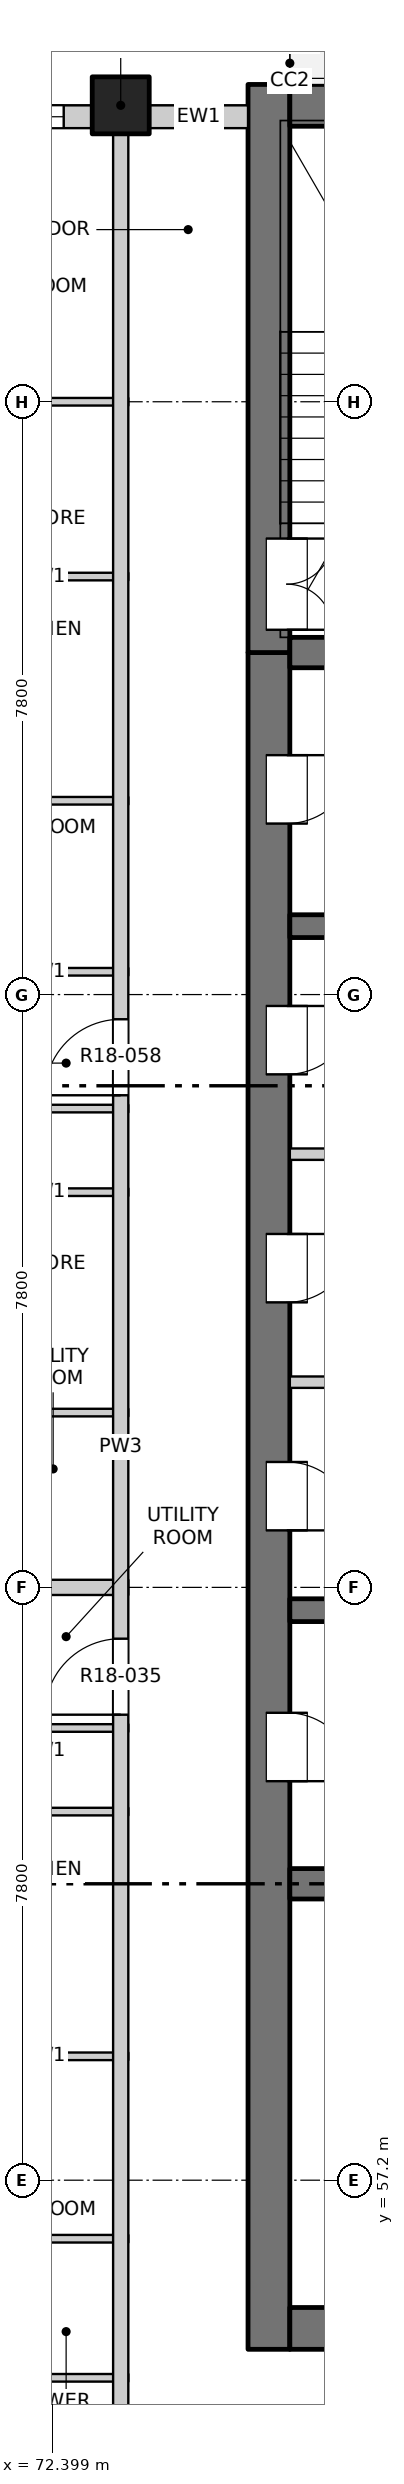
"""IFC4 building model, lengths in metres.
Left out: names, types, materials, properties, quantities, classifications, styles, units other than length and angle.
Written with IfcOpenShell. Run it as: python <this file> out.ifc"""

import sys

from ifc_helpers import new_model, si_unit, direction, frame, frame_2d, origin, origin_2d, place, context, subcontext, project, spatial, rectangle, extrude, element, fill, save


model = new_model("IFC4")
c1 = context("Model", 3, precision=1e-05, world=origin(), true_north=direction((0.0, 1.0)))
c2 = subcontext(c1, "Body", "Model", "MODEL_VIEW")
j1 = project(units=[si_unit("LENGTHUNIT", "METRE"), si_unit("PLANEANGLEUNIT", "RADIAN")], contexts=[c1])
p1 = place(None, origin())
s1 = spatial("IfcSite", under=j1, at=p1, CompositionType="ELEMENT")
p2 = place(p1, origin())
s2 = spatial("IfcBuilding", under=s1, at=p2, CompositionType="ELEMENT")
p3 = place(p2, frame((0.0, 0.0, 189.4)))
s3 = spatial("IfcBuildingStorey", under=s2, at=p3, CompositionType="ELEMENT", Elevation=189.4)
p4 = place(p3, frame((73.3, 84.5, -0.25), z_axis=(0.0, 0.0, 1.0), x_axis=(1.0, 0.0, 0.0)))
e1 = element("IfcColumn", 1, at=p4, inside=s3, PredefinedType="COLUMN", context=c2, shape_type="SweptSolid", body=[
    extrude(rectangle(XDim=0.75, YDim=0.75, at=origin_2d()), origin(), (0.0, 0.0, 1.0), 3.35),
])
p5 = place(p3, frame((75.25, 54.975, -0.25), z_axis=(0.0, 0.0, 1.0), x_axis=(0.0, 1.0, 0.0)))
e2 = element("IfcWall", 2, at=p5, inside=s3, PredefinedType="SOLIDWALL", context=c2, shape_type="SweptSolid", body=[
    extrude(rectangle(XDim=22.325, YDim=0.55, at=frame_2d((11.163, 0.0))), origin(), (0.0, 0.0, 1.0), 3.35),
])
p6 = place(p5, frame((7.475, 0.0, 0.25)))
e3 = element("IfcOpeningElement", 3, at=p6, cuts=e2, PredefinedType="OPENING", context=c2, shape_type="SweptSolid", body=[
    extrude(rectangle(XDim=0.9, YDim=2.1, at=frame_2d((0.45, 1.05))), frame((0.0, 0.285, 0.0), z_axis=(0.0, -1.0, 0.0), x_axis=(1.0, 0.0, 0.0)), (0.0, 0.0, 1.0), 0.57),
])
p7 = place(p5, frame((10.775, 0.0, 0.25)))
e4 = element("IfcOpeningElement", 4, at=p7, cuts=e2, PredefinedType="OPENING", context=c2, shape_type="SweptSolid", body=[
    extrude(rectangle(XDim=0.9, YDim=2.1, at=frame_2d((0.45, 1.05))), frame((0.0, 0.285, 0.0), z_axis=(0.0, -1.0, 0.0), x_axis=(1.0, 0.0, 0.0)), (0.0, 0.0, 1.0), 0.57),
])
p8 = place(p5, frame((13.775, 0.0, 0.25)))
e5 = element("IfcOpeningElement", 5, at=p8, cuts=e2, PredefinedType="OPENING", context=c2, shape_type="SweptSolid", body=[
    extrude(rectangle(XDim=0.9, YDim=2.1, at=frame_2d((0.45, 1.05))), frame((0.0, 0.285, 0.0), z_axis=(0.0, -1.0, 0.0), x_axis=(1.0, 0.0, 0.0)), (0.0, 0.0, 1.0), 0.57),
])
p9 = place(p5, frame((16.775, 0.0, 0.25)))
e6 = element("IfcOpeningElement", 6, at=p9, cuts=e2, PredefinedType="OPENING", context=c2, shape_type="SweptSolid", body=[
    extrude(rectangle(XDim=0.9, YDim=2.1, at=frame_2d((0.45, 1.05))), frame((0.0, 0.285, 0.0), z_axis=(0.0, -1.0, 0.0), x_axis=(1.0, 0.0, 0.0)), (0.0, 0.0, 1.0), 0.57),
])
p10 = place(p5, frame((20.075, 0.0, 0.25)))
e7 = element("IfcOpeningElement", 7, at=p10, cuts=e2, PredefinedType="OPENING", context=c2, shape_type="SweptSolid", body=[
    extrude(rectangle(XDim=0.9, YDim=2.1, at=frame_2d((0.45, 1.05))), frame((0.0, 0.285, 0.0), z_axis=(0.0, -1.0, 0.0), x_axis=(1.0, 0.0, 0.0)), (0.0, 0.0, 1.0), 0.57),
])
p11 = place(p3, frame((75.25, 77.3, -0.25), z_axis=(0.0, 0.0, 1.0), x_axis=(0.0, 1.0, 0.0)))
e8 = element("IfcWall", 8, at=p11, inside=s3, PredefinedType="SOLIDWALL", context=c2, shape_type="SweptSolid", body=[
    extrude(rectangle(XDim=7.475, YDim=0.55, at=frame_2d((3.737, 0.0))), origin(), (0.0, 0.0, 1.0), 3.35),
])
p12 = place(p11, frame((0.3, 0.0, 0.25)))
e9 = element("IfcOpeningElement", 9, at=p12, cuts=e8, PredefinedType="OPENING", context=c2, shape_type="SweptSolid", body=[
    extrude(rectangle(XDim=1.2, YDim=2.1, at=frame_2d((0.6, 1.05))), frame((0.0, 0.285, 0.0), z_axis=(0.0, -1.0, 0.0), x_axis=(1.0, 0.0, 0.0)), (0.0, 0.0, 1.0), 0.57),
])
p13 = place(p3, frame((75.525, 55.25, -0.25), z_axis=(0.0, 0.0, 1.0), x_axis=(1.0, 0.0, 0.0)))
e10 = element("IfcWall", 10, at=p13, inside=s3, PredefinedType="SOLIDWALL", context=c2, shape_type="SweptSolid", body=[
    extrude(rectangle(XDim=18.95, YDim=0.55, at=frame_2d((9.475, 0.0))), origin(), (0.0, 0.0, 1.0), 3.35),
])
p14 = place(p13, frame((8.725, 0.0, 0.25)))
e11 = element("IfcOpeningElement", 11, at=p14, cuts=e10, PredefinedType="OPENING", context=c2, shape_type="SweptSolid", body=[
    extrude(rectangle(XDim=1.5, YDim=2.1, at=frame_2d((0.75, 1.05))), frame((0.0, 0.285, 0.0), z_axis=(0.0, -1.0, 0.0), x_axis=(1.0, 0.0, 0.0)), (0.0, 0.0, 1.0), 0.57),
])
p15 = place(p3, frame((75.525, 84.5, -0.25), z_axis=(0.0, 0.0, 1.0), x_axis=(1.0, 0.0, 0.0)))
e12 = element("IfcWall", 12, at=p15, inside=s3, PredefinedType="SOLIDWALL", context=c2, shape_type="SweptSolid", body=[
    extrude(rectangle(XDim=18.95, YDim=0.55, at=frame_2d((9.475, 0.0))), origin(), (0.0, 0.0, 1.0), 3.35),
])
p16 = place(p3, frame((75.525, 61.1, -0.25), z_axis=(0.0, 0.0, 1.0), x_axis=(1.0, 0.0, 0.0)))
e13 = element("IfcWall", 13, at=p16, inside=s3, PredefinedType="SOLIDWALL", context=c2, shape_type="SweptSolid", body=[
    extrude(rectangle(XDim=3.775, YDim=0.4, at=frame_2d((1.888, 0.0))), origin(), (0.0, 0.0, 1.0), 3.35),
])
for number, where, z_axis, x_axis in (
    (14, (75.525, 64.7, -0.25), (0.0, 0.0, 1.0), (1.0, 0.0, 0.0)),
    (15, (75.525, 73.7, -0.25), (0.0, 0.0, 1.0), (1.0, 0.0, 0.0)),
):
    element("IfcWall", number, at=place(p3, frame(where, z_axis=z_axis, x_axis=x_axis)), inside=s3, PredefinedType="SOLIDWALL", context=c2, shape_type="SweptSolid", body=[
        extrude(rectangle(XDim=3.775, YDim=0.3, at=frame_2d((1.888, 0.0))), origin(), (0.0, 0.0, 1.0), 3.35),
    ])
p17 = place(p3, frame((75.525, 77.3, -0.25), z_axis=(0.0, 0.0, 1.0), x_axis=(1.0, 0.0, 0.0)))
e16 = element("IfcWall", 16, at=p17, inside=s3, PredefinedType="SOLIDWALL", context=c2, shape_type="SweptSolid", body=[
    extrude(rectangle(XDim=3.775, YDim=0.4, at=frame_2d((1.888, 0.0))), origin(), (0.0, 0.0, 1.0), 3.35),
])
p18 = place(p3, frame((69.4, 84.35, 0.0), z_axis=(0.0, 0.0, 1.0), x_axis=(1.0, 0.0, 0.0)))
e17 = element("IfcWall", 17, at=p18, inside=s3, PredefinedType="SOLIDWALL", context=c2, shape_type="SweptSolid", body=[
    extrude(rectangle(XDim=3.525, YDim=0.3, at=frame_2d((1.763, 0.0))), origin(), (0.0, 0.0, 1.0), 3.1),
])
p19 = place(p18, frame((0.75, 0.0, 0.9)))
e18 = element("IfcOpeningElement", 18, at=p19, cuts=e17, PredefinedType="OPENING", context=c2, shape_type="SweptSolid", body=[
    extrude(rectangle(XDim=2.4, YDim=1.8, at=frame_2d((1.2, 0.9))), frame((0.0, 0.16, 0.0), z_axis=(0.0, -1.0, 0.0), x_axis=(1.0, 0.0, 0.0)), (0.0, 0.0, 1.0), 0.32),
])
p20 = place(p3, frame((73.675, 84.35, 0.0), z_axis=(0.0, 0.0, 1.0), x_axis=(1.0, 0.0, 0.0)))
e19 = element("IfcWall", 19, at=p20, inside=s3, PredefinedType="SOLIDWALL", context=c2, shape_type="SweptSolid", body=[
    extrude(rectangle(XDim=1.3, YDim=0.3, at=frame_2d((0.65, 0.0))), origin(), (0.0, 0.0, 1.0), 3.1),
])
for number, where, z_axis, x_axis in (
    (20, (71.18, 54.6, 0.0), (0.0, 0.0, 1.0), (1.0, 0.0, 0.0)),
    (21, (71.18, 56.43, 0.0), (0.0, 0.0, 1.0), (1.0, 0.0, 0.0)),
    (22, (71.18, 58.83, 0.0), (0.0, 0.0, 1.0), (1.0, 0.0, 0.0)),
    (23, (71.18, 62.05, 0.0), (0.0, 0.0, 1.0), (1.0, 0.0, 0.0)),
    (24, (71.18, 63.15, 0.0), (0.0, 0.0, 1.0), (1.0, 0.0, 0.0)),
):
    element("IfcWall", number, at=place(p3, frame(where, z_axis=z_axis, x_axis=x_axis)), inside=s3, PredefinedType="PARTITIONING", context=c2, shape_type="SweptSolid", body=[
        extrude(rectangle(XDim=2.22, YDim=0.1, at=frame_2d((1.11, 0.0))), origin(), (0.0, 0.0, 1.0), 3.1),
    ])
p21 = place(p3, frame((65.8, 65.0, 0.0), z_axis=(0.0, 0.0, 1.0), x_axis=(1.0, 0.0, 0.0)))
e25 = element("IfcWall", 25, at=p21, inside=s3, PredefinedType="PARTITIONING", context=c2, shape_type="SweptSolid", body=[
    extrude(rectangle(XDim=7.6, YDim=0.2, at=frame_2d((3.8, 0.0))), origin(), (0.0, 0.0, 1.0), 3.1),
])
p22 = place(p3, frame((71.18, 67.3, 0.0), z_axis=(0.0, 0.0, 1.0), x_axis=(1.0, 0.0, 0.0)))
e26 = element("IfcWall", 26, at=p22, inside=s3, PredefinedType="PARTITIONING", context=c2, shape_type="SweptSolid", body=[
    extrude(rectangle(XDim=2.22, YDim=0.1, at=frame_2d((1.11, 0.0))), origin(), (0.0, 0.0, 1.0), 3.1),
])
p23 = place(p3, frame((75.525, 67.7, 0.0), z_axis=(0.0, 0.0, 1.0), x_axis=(1.0, 0.0, 0.0)))
e27 = element("IfcWall", 27, at=p23, inside=s3, PredefinedType="PARTITIONING", context=c2, shape_type="SweptSolid", body=[
    extrude(rectangle(XDim=3.775, YDim=0.15, at=frame_2d((1.887, 0.0))), origin(), (0.0, 0.0, 1.0), 3.1),
])
p24 = place(p3, frame((71.18, 70.2, 0.0), z_axis=(0.0, 0.0, 1.0), x_axis=(1.0, 0.0, 0.0)))
e28 = element("IfcWall", 28, at=p24, inside=s3, PredefinedType="PARTITIONING", context=c2, shape_type="SweptSolid", body=[
    extrude(rectangle(XDim=2.22, YDim=0.1, at=frame_2d((1.11, 0.0))), origin(), (0.0, 0.0, 1.0), 3.1),
])
p25 = place(p3, frame((75.525, 70.7, 0.0), z_axis=(0.0, 0.0, 1.0), x_axis=(1.0, 0.0, 0.0)))
e29 = element("IfcWall", 29, at=p25, inside=s3, PredefinedType="PARTITIONING", context=c2, shape_type="SweptSolid", body=[
    extrude(rectangle(XDim=3.775, YDim=0.15, at=frame_2d((1.887, 0.0))), origin(), (0.0, 0.0, 1.0), 3.1),
])
for number, where, z_axis, x_axis in (
    (30, (71.18, 71.3, 0.0), (0.0, 0.0, 1.0), (1.0, 0.0, 0.0)),
    (31, (71.18, 73.1, 0.0), (0.0, 0.0, 1.0), (1.0, 0.0, 0.0)),
    (32, (71.18, 75.35, 0.0), (0.0, 0.0, 1.0), (1.0, 0.0, 0.0)),
    (33, (71.18, 78.3, 0.0), (0.0, 0.0, 1.0), (1.0, 0.0, 0.0)),
):
    element("IfcWall", number, at=place(p3, frame(where, z_axis=z_axis, x_axis=x_axis)), inside=s3, PredefinedType="PARTITIONING", context=c2, shape_type="SweptSolid", body=[
        extrude(rectangle(XDim=2.22, YDim=0.1, at=frame_2d((1.11, 0.0))), origin(), (0.0, 0.0, 1.0), 3.1),
    ])
p26 = place(p3, frame((65.8, 80.6, 0.0), z_axis=(0.0, 0.0, 1.0), x_axis=(1.0, 0.0, 0.0)))
e34 = element("IfcWall", 34, at=p26, inside=s3, PredefinedType="PARTITIONING", context=c2, shape_type="SweptSolid", body=[
    extrude(rectangle(XDim=7.6, YDim=0.1, at=frame_2d((3.8, 0.0))), origin(), (0.0, 0.0, 1.0), 3.1),
])
p27 = place(p26, frame((4.14, 0.0, 0.0)))
e35 = element("IfcOpeningElement", 35, at=p27, cuts=e34, PredefinedType="OPENING", context=c2, shape_type="SweptSolid", body=[
    extrude(rectangle(XDim=0.9, YDim=2.1, at=frame_2d((0.45, 1.05))), frame((0.0, 0.06, 0.0), z_axis=(0.0, -1.0, 0.0), x_axis=(1.0, 0.0, 0.0)), (0.0, 0.0, 1.0), 0.12),
])
p28 = place(p3, frame((73.3, 49.5, 0.0), z_axis=(0.0, 0.0, 1.0), x_axis=(0.0, 1.0, 0.0)))
e36 = element("IfcWall", 36, at=p28, inside=s3, PredefinedType="PARTITIONING", context=c2, shape_type="SweptSolid", body=[
    extrude(rectangle(XDim=34.7, YDim=0.2, at=frame_2d((17.35, 0.0))), origin(), (0.0, 0.0, 1.0), 3.1),
])
p29 = place(p28, frame((13.825, 0.0, 0.0)))
e37 = element("IfcOpeningElement", 37, at=p29, cuts=e36, PredefinedType="OPENING", context=c2, shape_type="SweptSolid", body=[
    extrude(rectangle(XDim=1.0, YDim=2.1, at=frame_2d((0.5, 1.05))), frame((0.0, 0.11, 0.0), z_axis=(0.0, -1.0, 0.0), x_axis=(1.0, 0.0, 0.0)), (0.0, 0.0, 1.0), 0.22),
])
p30 = place(p28, frame((21.975, 0.0, 0.0)))
e38 = element("IfcOpeningElement", 38, at=p30, cuts=e36, PredefinedType="OPENING", context=c2, shape_type="SweptSolid", body=[
    extrude(rectangle(XDim=1.0, YDim=2.1, at=frame_2d((0.5, 1.05))), frame((0.0, 0.11, 0.0), z_axis=(0.0, -1.0, 0.0), x_axis=(1.0, 0.0, 0.0)), (0.0, 0.0, 1.0), 0.22),
])
p31 = place(p19, origin())
e39 = element("IfcWindow", 39, at=p31, inside=s3, PartitioningType="DOUBLE_PANEL_VERTICAL", PredefinedType="WINDOW", context=c2, shape_type="SweptSolid", body=[
    extrude(rectangle(XDim=2.4, YDim=1.8, at=frame_2d((1.2, 0.9))), frame((0.0, 0.03, 0.0), z_axis=(0.0, -1.0, 0.0), x_axis=(1.0, 0.0, 0.0)), (0.0, 0.0, 1.0), 0.06),
])
fill(e18, e39)
p32 = place(p6, origin())
e40 = element("IfcDoor", 40, at=p32, inside=s3, OperationType="SINGLE_SWING_RIGHT", PredefinedType="DOOR", context=c2, shape_type="SweptSolid", body=[
    extrude(rectangle(XDim=0.9, YDim=2.1, at=frame_2d((0.45, 1.05))), frame((0.0, -0.21, 0.0), z_axis=(0.0, -1.0, 0.0), x_axis=(1.0, 0.0, 0.0)), (0.0, 0.0, 1.0), 0.05),
])
fill(e3, e40)
p33 = place(p29, origin())
e41 = element("IfcDoor", 41, at=p33, inside=s3, OperationType="SINGLE_SWING_RIGHT", PredefinedType="DOOR", context=c2, shape_type="SweptSolid", body=[
    extrude(rectangle(XDim=1.0, YDim=2.1, at=frame_2d((0.5, 1.05))), frame((0.0, 0.025, 0.0), z_axis=(0.0, -1.0, 0.0), x_axis=(1.0, 0.0, 0.0)), (0.0, 0.0, 1.0), 0.05),
])
fill(e37, e41)
p34 = place(p7, origin())
e42 = element("IfcDoor", 42, at=p34, inside=s3, OperationType="SINGLE_SWING_RIGHT", PredefinedType="DOOR", context=c2, shape_type="SweptSolid", body=[
    extrude(rectangle(XDim=0.9, YDim=2.1, at=frame_2d((0.45, 1.05))), frame((0.0, -0.21, 0.0), z_axis=(0.0, -1.0, 0.0), x_axis=(1.0, 0.0, 0.0)), (0.0, 0.0, 1.0), 0.05),
])
fill(e4, e42)
p35 = place(p8, origin())
e43 = element("IfcDoor", 43, at=p35, inside=s3, OperationType="SINGLE_SWING_LEFT", PredefinedType="DOOR", context=c2, shape_type="SweptSolid", body=[
    extrude(rectangle(XDim=0.9, YDim=2.1, at=frame_2d((0.45, 1.05))), frame((0.0, -0.21, 0.0), z_axis=(0.0, -1.0, 0.0), x_axis=(1.0, 0.0, 0.0)), (0.0, 0.0, 1.0), 0.05),
])
fill(e5, e43)
p36 = place(p30, origin())
e44 = element("IfcDoor", 44, at=p36, inside=s3, OperationType="SINGLE_SWING_RIGHT", PredefinedType="DOOR", context=c2, shape_type="SweptSolid", body=[
    extrude(rectangle(XDim=1.0, YDim=2.1, at=frame_2d((0.5, 1.05))), frame((0.0, 0.025, 0.0), z_axis=(0.0, -1.0, 0.0), x_axis=(1.0, 0.0, 0.0)), (0.0, 0.0, 1.0), 0.05),
])
fill(e38, e44)
p37 = place(p9, origin())
e45 = element("IfcDoor", 45, at=p37, inside=s3, OperationType="SINGLE_SWING_LEFT", PredefinedType="DOOR", context=c2, shape_type="SweptSolid", body=[
    extrude(rectangle(XDim=0.9, YDim=2.1, at=frame_2d((0.45, 1.05))), frame((0.0, -0.21, 0.0), z_axis=(0.0, -1.0, 0.0), x_axis=(1.0, 0.0, 0.0)), (0.0, 0.0, 1.0), 0.05),
])
fill(e6, e45)
p38 = place(p10, origin())
e46 = element("IfcDoor", 46, at=p38, inside=s3, OperationType="SINGLE_SWING_LEFT", PredefinedType="DOOR", context=c2, shape_type="SweptSolid", body=[
    extrude(rectangle(XDim=0.9, YDim=2.1, at=frame_2d((0.45, 1.05))), frame((0.0, -0.21, 0.0), z_axis=(0.0, -1.0, 0.0), x_axis=(1.0, 0.0, 0.0)), (0.0, 0.0, 1.0), 0.05),
])
fill(e7, e46)
p39 = place(p12, origin())
e47 = element("IfcDoor", 47, at=p39, inside=s3, OperationType="DOUBLE_DOOR_SINGLE_SWING", PredefinedType="DOOR", context=c2, shape_type="SweptSolid", body=[
    extrude(rectangle(XDim=1.2, YDim=2.1, at=frame_2d((0.6, 1.05))), frame((0.0, -0.21, 0.0), z_axis=(0.0, -1.0, 0.0), x_axis=(1.0, 0.0, 0.0)), (0.0, 0.0, 1.0), 0.05),
])
fill(e9, e47)
save(model, sys.argv[1])
